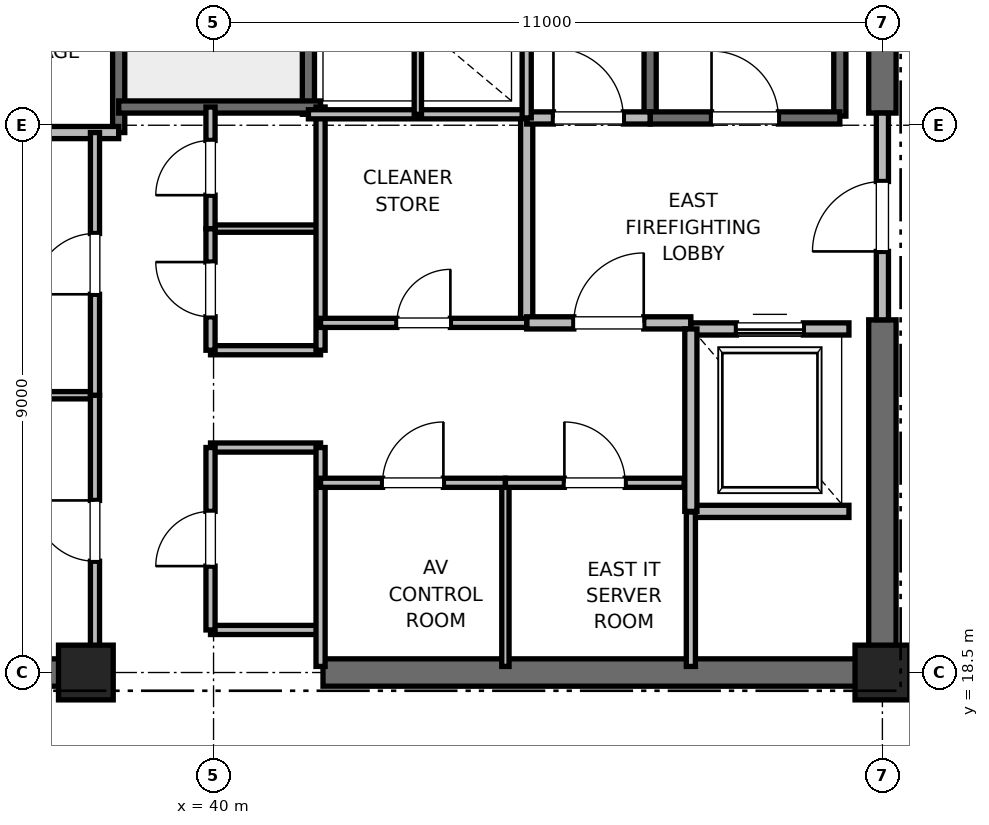
"""IFC4 building model, lengths in metres.
Left out: names, types, materials, properties, quantities, classifications, styles, units other than length and angle.
Written with IfcOpenShell. Run it as: python <this file> out.ifc"""

import sys

from ifc_helpers import new_model, si_unit, direction, frame, frame_2d, origin, origin_2d, place, context, subcontext, project, spatial, rectangle, extrude, element, fill, save


model = new_model("IFC4")
c1 = context("Model", 3, precision=1e-05, world=origin(), true_north=direction((0.0, 1.0)))
c2 = subcontext(c1, "Body", "Model", "MODEL_VIEW")
j1 = project(units=[si_unit("LENGTHUNIT", "METRE"), si_unit("PLANEANGLEUNIT", "RADIAN")], contexts=[c1])
p1 = place(None, origin())
s1 = spatial("IfcSite", under=j1, at=p1, CompositionType="ELEMENT")
p2 = place(p1, origin())
s2 = spatial("IfcBuilding", under=s1, at=p2, CompositionType="ELEMENT")
p3 = place(p2, frame((0.0, 0.0, 267.2)))
s3 = spatial("IfcBuildingStorey", under=s2, at=p3, CompositionType="ELEMENT", Elevation=267.2)
for number, where, z_axis, x_axis in (
    (1, (51.0, 18.5, 0.0), (0.0, 0.0, 1.0), (1.0, 0.0, 0.0)),
    (2, (37.9, 18.5, 0.0), (0.0, 0.0, 1.0), (1.0, 0.0, 0.0)),
):
    element("IfcColumn", number, at=place(p3, frame(where, z_axis=z_axis, x_axis=x_axis)), inside=s3, PredefinedType="PILASTER", context=c2, shape_type="SweptSolid", body=[
        extrude(rectangle(XDim=0.9, YDim=0.9, at=origin_2d()), origin(), (0.0, 0.0, 1.0), 4.0),
    ])
for number, where, z_axis, x_axis in (
    (3, (29.0, 18.5, 0.0), (0.0, 0.0, 1.0), (1.0, 0.0, 0.0)),
    (4, (41.8, 18.5, 0.0), (0.0, 0.0, 1.0), (1.0, 0.0, 0.0)),
):
    element("IfcWall", number, at=place(p3, frame(where, z_axis=z_axis, x_axis=x_axis)), inside=s3, PredefinedType="SHEAR", context=c2, shape_type="SweptSolid", body=[
        extrude(rectangle(XDim=9.2, YDim=0.45, at=frame_2d((4.6, 0.0))), origin(), (0.0, 0.0, 1.0), 3.785),
    ])
p4 = place(p3, frame((51.0, 18.5, 0.0), z_axis=(0.0, 0.0, 1.0), x_axis=(0.0, 1.0, 0.0)))
e5 = element("IfcWall", 5, at=p4, inside=s3, PredefinedType="SHEAR", context=c2, shape_type="SweptSolid", body=[
    extrude(rectangle(XDim=5.8, YDim=0.45, at=frame_2d((2.9, 0.0))), origin(), (0.0, 0.0, 1.0), 3.785),
])
p5 = place(p3, frame((51.0, 27.7, 0.0), z_axis=(0.0, 0.0, 1.0), x_axis=(0.0, 1.0, 0.0)))
e6 = element("IfcWall", 6, at=p5, inside=s3, PredefinedType="SHEAR", context=c2, shape_type="SweptSolid", body=[
    extrude(rectangle(XDim=8.8, YDim=0.45, at=frame_2d((4.4, 0.0))), origin(), (0.0, 0.0, 1.0), 3.785),
])
p6 = place(p3, frame((50.3, 27.65, 0.0), z_axis=(0.0, 0.0, 1.0), x_axis=(0.0, 1.0, 0.0)))
e7 = element("IfcWall", 7, at=p6, inside=s3, PredefinedType="SOLIDWALL", context=c2, shape_type="SweptSolid", body=[
    extrude(rectangle(XDim=8.15, YDim=0.2, at=frame_2d((4.075, 0.0))), origin(), (0.0, 0.0, 1.0), 3.785),
])
p7 = place(p3, frame((47.18, 27.62, 0.0), z_axis=(0.0, 0.0, 1.0), x_axis=(0.0, 1.0, 0.0)))
e8 = element("IfcWall", 8, at=p7, inside=s3, PredefinedType="SOLIDWALL", context=c2, shape_type="SweptSolid", body=[
    extrude(rectangle(XDim=8.18, YDim=0.2, at=frame_2d((4.09, 0.0))), origin(), (0.0, 0.0, 1.0), 3.785),
])
p8 = place(p3, frame((47.18, 27.62, 0.0), z_axis=(0.0, 0.0, 1.0), x_axis=(1.0, 0.0, 0.0)))
e9 = element("IfcWall", 9, at=p8, inside=s3, PredefinedType="SOLIDWALL", context=c2, shape_type="SweptSolid", body=[
    extrude(rectangle(XDim=3.12, YDim=0.2, at=frame_2d((1.56, 0.0))), origin(), (0.0, 0.0, 1.0), 3.785),
])
p9 = place(p8, frame((1.01, 0.0, 0.0)))
e10 = element("IfcOpeningElement", 10, at=p9, cuts=e9, PredefinedType="OPENING", context=c2, shape_type="SweptSolid", body=[
    extrude(rectangle(XDim=1.1, YDim=2.15, at=frame_2d((0.55, 1.075))), frame((0.0, 0.1, 0.0), z_axis=(0.0, -1.0, 0.0), x_axis=(1.0, 0.0, 0.0)), (0.0, 0.0, 1.0), 0.2),
])
p10 = place(p3, frame((38.44, 27.38, 0.0), z_axis=(0.0, 0.0, 1.0), x_axis=(0.0, 1.0, 0.0)))
e11 = element("IfcWall", 11, at=p10, inside=s3, PredefinedType="SOLIDWALL", context=c2, shape_type="SweptSolid", body=[
    extrude(rectangle(XDim=8.87, YDim=0.2, at=frame_2d((4.435, 0.0))), origin(), (0.0, 0.0, 1.0), 3.785),
])
p11 = place(p3, frame((41.56, 27.68, 0.0), z_axis=(0.0, 0.0, 1.0), x_axis=(0.0, 1.0, 0.0)))
e12 = element("IfcWall", 12, at=p11, inside=s3, PredefinedType="SOLIDWALL", context=c2, shape_type="SweptSolid", body=[
    extrude(rectangle(XDim=8.57, YDim=0.2, at=frame_2d((4.285, 0.0))), origin(), (0.0, 0.0, 1.0), 3.785),
])
p12 = place(p3, frame((38.44, 27.8, 0.0), z_axis=(0.0, 0.0, 1.0), x_axis=(1.0, 0.0, 0.0)))
e13 = element("IfcWall", 13, at=p12, inside=s3, PredefinedType="SOLIDWALL", context=c2, shape_type="SweptSolid", body=[
    extrude(rectangle(XDim=3.32, YDim=0.2, at=frame_2d((1.66, 0.0))), origin(), (0.0, 0.0, 1.0), 3.785),
])
p13 = place(p3, frame((32.82, 27.38, 0.0), z_axis=(0.0, 0.0, 1.0), x_axis=(1.0, 0.0, 0.0)))
e14 = element("IfcWall", 14, at=p13, inside=s3, PredefinedType="PARTITIONING", context=c2, shape_type="SweptSolid", body=[
    extrude(rectangle(XDim=5.62, YDim=0.2, at=frame_2d((2.81, 0.0))), origin(), (0.0, 0.0, 1.0), 3.785),
])
p14 = place(p3, frame((45.15, 24.25, 0.0), z_axis=(0.0, 0.0, 1.0), x_axis=(0.0, 1.0, 0.0)))
e15 = element("IfcWall", 15, at=p14, inside=s3, PredefinedType="PARTITIONING", context=c2, shape_type="SweptSolid", body=[
    extrude(rectangle(XDim=3.37, YDim=0.2, at=frame_2d((1.685, 0.0))), origin(), (0.0, 0.0, 1.0), 3.785),
])
p15 = place(p3, frame((45.15, 24.25, 0.0), z_axis=(0.0, 0.0, 1.0), x_axis=(1.0, 0.0, 0.0)))
e16 = element("IfcWall", 16, at=p15, inside=s3, PredefinedType="PARTITIONING", context=c2, shape_type="SweptSolid", body=[
    extrude(rectangle(XDim=2.7, YDim=0.2, at=frame_2d((1.35, 0.0))), origin(), (0.0, 0.0, 1.0), 3.785),
])
p16 = place(p15, frame((0.775, 0.0, 0.0)))
e17 = element("IfcOpeningElement", 17, at=p16, cuts=e16, PredefinedType="OPENING", context=c2, shape_type="SweptSolid", body=[
    extrude(rectangle(XDim=1.15, YDim=2.2, at=frame_2d((0.575, 1.1))), frame((0.0, 0.1, 0.0), z_axis=(0.0, -1.0, 0.0), x_axis=(1.0, 0.0, 0.0)), (0.0, 0.0, 1.0), 0.2),
])
p17 = place(p3, frame((45.15, 27.62, 0.0), z_axis=(0.0, 0.0, 1.0), x_axis=(1.0, 0.0, 0.0)))
e18 = element("IfcWall", 18, at=p17, inside=s3, PredefinedType="PARTITIONING", context=c2, shape_type="SweptSolid", body=[
    extrude(rectangle(XDim=2.03, YDim=0.2, at=frame_2d((1.015, 0.0))), origin(), (0.0, 0.0, 1.0), 3.785),
])
p18 = place(p17, frame((0.44, 0.0, 0.0)))
e19 = element("IfcOpeningElement", 19, at=p18, cuts=e18, PredefinedType="OPENING", context=c2, shape_type="SweptSolid", body=[
    extrude(rectangle(XDim=1.15, YDim=2.2, at=frame_2d((0.575, 1.1))), frame((0.0, 0.1, 0.0), z_axis=(0.0, -1.0, 0.0), x_axis=(1.0, 0.0, 0.0)), (0.0, 0.0, 1.0), 0.2),
])
p19 = place(p3, frame((51.0, 24.3, 0.0), z_axis=(0.0, 0.0, 1.0), x_axis=(0.0, 1.0, 0.0)))
e20 = element("IfcWall", 20, at=p19, inside=s3, PredefinedType="PARTITIONING", context=c2, shape_type="SweptSolid", body=[
    extrude(rectangle(XDim=3.4, YDim=0.2, at=frame_2d((1.7, 0.0))), origin(), (0.0, 0.0, 1.0), 2.865),
])
p20 = place(p19, frame((1.125, 0.0, 0.0)))
e21 = element("IfcOpeningElement", 21, at=p20, cuts=e20, PredefinedType="OPENING", context=c2, shape_type="SweptSolid", body=[
    extrude(rectangle(XDim=1.15, YDim=2.2, at=frame_2d((0.575, 1.1))), frame((0.0, 0.1, 0.0), z_axis=(0.0, -1.0, 0.0), x_axis=(1.0, 0.0, 0.0)), (0.0, 0.0, 1.0), 0.2),
])
p21 = place(p3, frame((47.85, 21.15, 0.0), z_axis=(0.0, 0.0, 1.0), x_axis=(1.0, 0.0, 0.0)))
e22 = element("IfcWall", 22, at=p21, inside=s3, PredefinedType="SOLIDWALL", context=c2, shape_type="SweptSolid", body=[
    extrude(rectangle(XDim=2.6, YDim=0.2, at=frame_2d((1.3, 0.0))), origin(), (0.0, 0.0, 1.0), 3.785),
])
p22 = place(p3, frame((50.45, 24.15, 0.0), z_axis=(0.0, 0.0, 1.0), x_axis=(-1.0, 0.0, 0.0)))
e23 = element("IfcWall", 23, at=p22, inside=s3, PredefinedType="SOLIDWALL", context=c2, shape_type="SweptSolid", body=[
    extrude(rectangle(XDim=2.6, YDim=0.2, at=frame_2d((1.3, 0.0))), origin(), (0.0, 0.0, 1.0), 2.865),
])
p23 = place(p22, frame((0.75, 0.0, 0.0)))
e24 = element("IfcOpeningElement", 24, at=p23, cuts=e23, PredefinedType="OPENING", context=c2, shape_type="SweptSolid", body=[
    extrude(rectangle(XDim=1.1, YDim=2.2, at=frame_2d((0.55, 1.1))), frame((0.0, 0.1, 0.0), z_axis=(0.0, -1.0, 0.0), x_axis=(1.0, 0.0, 0.0)), (0.0, 0.0, 1.0), 0.2),
])
p24 = place(p3, frame((47.85, 24.15, 0.0), z_axis=(0.0, 0.0, 1.0), x_axis=(0.0, -1.0, 0.0)))
e25 = element("IfcWall", 25, at=p24, inside=s3, PredefinedType="SOLIDWALL", context=c2, shape_type="SweptSolid", body=[
    extrude(rectangle(XDim=3.0, YDim=0.2, at=frame_2d((1.5, 0.0))), origin(), (0.0, 0.0, 1.0), 3.785),
])
for number, where, z_axis, x_axis in (
    (26, (39.95, 19.2, 0.0), (0.0, 0.0, 1.0), (1.0, 0.0, 0.0)),
    (27, (39.95, 22.2, 0.0), (0.0, 0.0, 1.0), (1.0, 0.0, 0.0)),
    (28, (39.95, 23.8, 0.0), (0.0, 0.0, 1.0), (1.0, 0.0, 0.0)),
):
    element("IfcWall", number, at=place(p3, frame(where, z_axis=z_axis, x_axis=x_axis)), inside=s3, PredefinedType="PARTITIONING", context=c2, shape_type="SweptSolid", body=[
        extrude(rectangle(XDim=1.81, YDim=0.15, at=frame_2d((0.905, 0.0))), origin(), (0.0, 0.0, 1.0), 2.85),
    ])
p25 = place(p3, frame((39.95, 25.8, 0.0), z_axis=(0.0, 0.0, 1.0), x_axis=(1.0, 0.0, 0.0)))
e29 = element("IfcWall", 29, at=p25, inside=s3, PredefinedType="PARTITIONING", context=c2, shape_type="SweptSolid", body=[
    extrude(rectangle(XDim=1.81, YDim=0.12, at=frame_2d((0.905, 0.0))), origin(), (0.0, 0.0, 1.0), 2.85),
])
p26 = place(p3, frame((41.76, 18.6, 0.0), z_axis=(0.0, 0.0, 1.0), x_axis=(0.0, 1.0, 0.0)))
e30 = element("IfcWall", 30, at=p26, inside=s3, PredefinedType="PARTITIONING", context=c2, shape_type="SweptSolid", body=[
    extrude(rectangle(XDim=3.6, YDim=0.15, at=frame_2d((1.8, 0.0))), origin(), (0.0, 0.0, 1.0), 2.85),
])
p27 = place(p3, frame((41.76, 23.8, 0.0), z_axis=(0.0, 0.0, 1.0), x_axis=(0.0, 1.0, 0.0)))
e31 = element("IfcWall", 31, at=p27, inside=s3, PredefinedType="PARTITIONING", context=c2, shape_type="SweptSolid", body=[
    extrude(rectangle(XDim=4.0, YDim=0.15, at=frame_2d((2.0, 0.0))), origin(), (0.0, 0.0, 1.0), 2.85),
])
p28 = place(p3, frame((39.95, 19.2, 0.0), z_axis=(0.0, 0.0, 1.0), x_axis=(0.0, 1.0, 0.0)))
e32 = element("IfcWall", 32, at=p28, inside=s3, PredefinedType="PARTITIONING", context=c2, shape_type="SweptSolid", body=[
    extrude(rectangle(XDim=3.0, YDim=0.15, at=frame_2d((1.5, 0.0))), origin(), (0.0, 0.0, 1.0), 2.85),
])
p29 = place(p28, frame((1.05, 0.0, 0.0)))
e33 = element("IfcOpeningElement", 33, at=p29, cuts=e32, PredefinedType="OPENING", context=c2, shape_type="SweptSolid", body=[
    extrude(rectangle(XDim=0.9, YDim=2.1, at=frame_2d((0.45, 1.05))), frame((0.0, 0.075, 0.0), z_axis=(0.0, -1.0, 0.0), x_axis=(1.0, 0.0, 0.0)), (0.0, 0.0, 1.0), 0.15),
])
p30 = place(p3, frame((39.95, 23.8, 0.0), z_axis=(0.0, 0.0, 1.0), x_axis=(0.0, 1.0, 0.0)))
e34 = element("IfcWall", 34, at=p30, inside=s3, PredefinedType="PARTITIONING", context=c2, shape_type="SweptSolid", body=[
    extrude(rectangle(XDim=2.0, YDim=0.15, at=frame_2d((1.0, 0.0))), origin(), (0.0, 0.0, 1.0), 2.85),
])
p31 = place(p30, frame((0.55, 0.0, 0.0)))
e35 = element("IfcOpeningElement", 35, at=p31, cuts=e34, PredefinedType="OPENING", context=c2, shape_type="SweptSolid", body=[
    extrude(rectangle(XDim=0.9, YDim=2.1, at=frame_2d((0.45, 1.05))), frame((0.0, 0.075, 0.0), z_axis=(0.0, -1.0, 0.0), x_axis=(1.0, 0.0, 0.0)), (0.0, 0.0, 1.0), 0.15),
])
p32 = place(p3, frame((39.95, 25.8, 0.0), z_axis=(0.0, 0.0, 1.0), x_axis=(0.0, 1.0, 0.0)))
e36 = element("IfcWall", 36, at=p32, inside=s3, PredefinedType="PARTITIONING", context=c2, shape_type="SweptSolid", body=[
    extrude(rectangle(XDim=2.0, YDim=0.15, at=frame_2d((1.0, 0.0))), origin(), (0.0, 0.0, 1.0), 2.85),
])
p33 = place(p32, frame((0.55, 0.0, 0.0)))
e37 = element("IfcOpeningElement", 37, at=p33, cuts=e36, PredefinedType="OPENING", context=c2, shape_type="SweptSolid", body=[
    extrude(rectangle(XDim=0.9, YDim=2.1, at=frame_2d((0.45, 1.05))), frame((0.0, 0.075, 0.0), z_axis=(0.0, -1.0, 0.0), x_axis=(1.0, 0.0, 0.0)), (0.0, 0.0, 1.0), 0.15),
])
p34 = place(p3, frame((32.82, 23.06, 0.0), z_axis=(0.0, 0.0, 1.0), x_axis=(1.0, 0.0, 0.0)))
e38 = element("IfcWall", 38, at=p34, inside=s3, PredefinedType="PARTITIONING", context=c2, shape_type="SweptSolid", body=[
    extrude(rectangle(XDim=5.23, YDim=0.12, at=frame_2d((2.615, 0.0))), origin(), (0.0, 0.0, 1.0), 2.85),
])
p35 = place(p3, frame((38.05, 18.6, 0.0), z_axis=(0.0, 0.0, 1.0), x_axis=(0.0, 1.0, 0.0)))
e39 = element("IfcWall", 39, at=p35, inside=s3, PredefinedType="PARTITIONING", context=c2, shape_type="SweptSolid", body=[
    extrude(rectangle(XDim=4.46, YDim=0.15, at=frame_2d((2.23, 0.0))), origin(), (0.0, 0.0, 1.0), 2.85),
])
p36 = place(p35, frame((1.73, 0.0, 0.0)))
e40 = element("IfcOpeningElement", 40, at=p36, cuts=e39, PredefinedType="OPENING", context=c2, shape_type="SweptSolid", body=[
    extrude(rectangle(XDim=1.0, YDim=2.15, at=frame_2d((0.5, 1.075))), frame((0.0, 0.075, 0.0), z_axis=(0.0, -1.0, 0.0), x_axis=(1.0, 0.0, 0.0)), (0.0, 0.0, 1.0), 0.15),
])
p37 = place(p3, frame((38.05, 23.06, 0.0), z_axis=(0.0, 0.0, 1.0), x_axis=(0.0, 1.0, 0.0)))
e41 = element("IfcWall", 41, at=p37, inside=s3, PredefinedType="PARTITIONING", context=c2, shape_type="SweptSolid", body=[
    extrude(rectangle(XDim=4.32, YDim=0.15, at=frame_2d((2.16, 0.0))), origin(), (0.0, 0.0, 1.0), 2.85),
])
p38 = place(p37, frame((1.66, 0.0, 0.0)))
e42 = element("IfcOpeningElement", 42, at=p38, cuts=e41, PredefinedType="OPENING", context=c2, shape_type="SweptSolid", body=[
    extrude(rectangle(XDim=1.0, YDim=2.15, at=frame_2d((0.5, 1.075))), frame((0.0, 0.075, 0.0), z_axis=(0.0, -1.0, 0.0), x_axis=(1.0, 0.0, 0.0)), (0.0, 0.0, 1.0), 0.15),
])
p39 = place(p3, frame((41.56, 27.68, 0.0), z_axis=(0.0, 0.0, 1.0), x_axis=(1.0, 0.0, 0.0)))
e43 = element("IfcWall", 43, at=p39, inside=s3, PredefinedType="PARTITIONING", context=c2, shape_type="SweptSolid", body=[
    extrude(rectangle(XDim=3.59, YDim=0.15, at=frame_2d((1.795, 0.0))), origin(), (0.0, 0.0, 1.0), 2.85),
])
p40 = place(p3, frame((47.85, 18.6, 0.0), z_axis=(0.0, 0.0, 1.0), x_axis=(0.0, 1.0, 0.0)))
e44 = element("IfcWall", 44, at=p40, inside=s3, PredefinedType="PARTITIONING", context=c2, shape_type="SweptSolid", body=[
    extrude(rectangle(XDim=2.54, YDim=0.15, at=frame_2d((1.27, 0.0))), origin(), (0.0, 0.0, 1.0), 2.85),
])
p41 = place(p3, frame((44.8, 18.6, 0.0), z_axis=(0.0, 0.0, 1.0), x_axis=(0.0, 1.0, 0.0)))
e45 = element("IfcWall", 45, at=p41, inside=s3, PredefinedType="PARTITIONING", context=c2, shape_type="SweptSolid", body=[
    extrude(rectangle(XDim=3.02, YDim=0.12, at=frame_2d((1.51, 0.0))), origin(), (0.0, 0.0, 1.0), 2.85),
])
p42 = place(p3, frame((41.76, 21.62, 0.0), z_axis=(0.0, 0.0, 1.0), x_axis=(1.0, 0.0, 0.0)))
e46 = element("IfcWall", 46, at=p42, inside=s3, PredefinedType="PARTITIONING", context=c2, shape_type="SweptSolid", body=[
    extrude(rectangle(XDim=3.04, YDim=0.15, at=frame_2d((1.52, 0.0))), origin(), (0.0, 0.0, 1.0), 2.85),
])
p43 = place(p42, frame((1.02, 0.0, 0.0)))
e47 = element("IfcOpeningElement", 47, at=p43, cuts=e46, PredefinedType="OPENING", context=c2, shape_type="SweptSolid", body=[
    extrude(rectangle(XDim=1.0, YDim=2.15, at=frame_2d((0.5, 1.075))), frame((0.0, 0.075, 0.0), z_axis=(0.0, -1.0, 0.0), x_axis=(1.0, 0.0, 0.0)), (0.0, 0.0, 1.0), 0.15),
])
p44 = place(p3, frame((44.8, 21.62, 0.0), z_axis=(0.0, 0.0, 1.0), x_axis=(1.0, 0.0, 0.0)))
e48 = element("IfcWall", 48, at=p44, inside=s3, PredefinedType="PARTITIONING", context=c2, shape_type="SweptSolid", body=[
    extrude(rectangle(XDim=2.94, YDim=0.15, at=frame_2d((1.47, 0.0))), origin(), (0.0, 0.0, 1.0), 2.85),
])
p45 = place(p44, frame((0.97, 0.0, 0.0)))
e49 = element("IfcOpeningElement", 49, at=p45, cuts=e48, PredefinedType="OPENING", context=c2, shape_type="SweptSolid", body=[
    extrude(rectangle(XDim=1.0, YDim=2.15, at=frame_2d((0.5, 1.075))), frame((0.0, 0.075, 0.0), z_axis=(0.0, -1.0, 0.0), x_axis=(1.0, 0.0, 0.0)), (0.0, 0.0, 1.0), 0.15),
])
p46 = place(p3, frame((41.76, 24.25, 0.0), z_axis=(0.0, 0.0, 1.0), x_axis=(1.0, 0.0, 0.0)))
e50 = element("IfcWall", 50, at=p46, inside=s3, PredefinedType="PARTITIONING", context=c2, shape_type="SweptSolid", body=[
    extrude(rectangle(XDim=3.39, YDim=0.15, at=frame_2d((1.695, 0.0))), origin(), (0.0, 0.0, 1.0), 2.85),
])
p47 = place(p46, frame((1.255, 0.0, 0.0)))
e51 = element("IfcOpeningElement", 51, at=p47, cuts=e50, PredefinedType="OPENING", context=c2, shape_type="SweptSolid", body=[
    extrude(rectangle(XDim=0.88, YDim=2.1, at=frame_2d((0.44, 1.05))), frame((0.0, 0.075, 0.0), z_axis=(0.0, -1.0, 0.0), x_axis=(1.0, 0.0, 0.0)), (0.0, 0.0, 1.0), 0.15),
])
p48 = place(p3, frame((45.15, 27.62, 0.0), z_axis=(0.0, 0.0, 1.0), x_axis=(0.0, 1.0, 0.0)))
e52 = element("IfcWall", 52, at=p48, inside=s3, PredefinedType="PARTITIONING", context=c2, shape_type="SweptSolid", body=[
    extrude(rectangle(XDim=3.1, YDim=0.15, at=frame_2d((1.55, 0.0))), origin(), (0.0, 0.0, 1.0), 2.85),
])
p49 = place(p3, frame((43.36, 27.68, 0.0), z_axis=(0.0, 0.0, 1.0), x_axis=(0.0, 1.0, 0.0)))
e53 = element("IfcWall", 53, at=p49, inside=s3, PredefinedType="PARTITIONING", context=c2, shape_type="SweptSolid", body=[
    extrude(rectangle(XDim=3.04, YDim=0.12, at=frame_2d((1.52, 0.0))), origin(), (0.0, 0.0, 1.0), 2.85),
])
p50 = place(p9, origin())
e54 = element("IfcDoor", 54, at=p50, inside=s3, OperationType="SINGLE_SWING_LEFT", PredefinedType="DOOR", context=c2, shape_type="SweptSolid", body=[
    extrude(rectangle(XDim=1.1, YDim=2.15, at=frame_2d((0.55, 1.075))), frame((0.0, 0.025, 0.0), z_axis=(0.0, -1.0, 0.0), x_axis=(1.0, 0.0, 0.0)), (0.0, 0.0, 1.0), 0.05),
])
fill(e10, e54)
p51 = place(p16, origin())
e55 = element("IfcDoor", 55, at=p51, inside=s3, OperationType="SINGLE_SWING_RIGHT", PredefinedType="DOOR", context=c2, shape_type="SweptSolid", body=[
    extrude(rectangle(XDim=1.15, YDim=2.2, at=frame_2d((0.575, 1.1))), frame((0.0, 0.025, 0.0), z_axis=(0.0, -1.0, 0.0), x_axis=(1.0, 0.0, 0.0)), (0.0, 0.0, 1.0), 0.05),
])
fill(e17, e55)
p52 = place(p18, origin())
e56 = element("IfcDoor", 56, at=p52, inside=s3, OperationType="SINGLE_SWING_LEFT", PredefinedType="DOOR", context=c2, shape_type="SweptSolid", body=[
    extrude(rectangle(XDim=1.15, YDim=2.2, at=frame_2d((0.575, 1.1))), frame((0.0, 0.025, 0.0), z_axis=(0.0, -1.0, 0.0), x_axis=(1.0, 0.0, 0.0)), (0.0, 0.0, 1.0), 0.05),
])
fill(e19, e56)
p53 = place(p20, origin())
e57 = element("IfcDoor", 57, at=p53, inside=s3, OperationType="SINGLE_SWING_LEFT", PredefinedType="DOOR", context=c2, shape_type="SweptSolid", body=[
    extrude(rectangle(XDim=1.15, YDim=2.2, at=frame_2d((0.575, 1.1))), frame((0.0, 0.025, 0.0), z_axis=(0.0, -1.0, 0.0), x_axis=(1.0, 0.0, 0.0)), (0.0, 0.0, 1.0), 0.05),
])
fill(e21, e57)
p54 = place(p23, origin())
e58 = element("IfcDoor", 58, at=p54, inside=s3, OperationType="SLIDING_TO_RIGHT", PredefinedType="DOOR", context=c2, shape_type="SweptSolid", body=[
    extrude(rectangle(XDim=1.1, YDim=2.2, at=frame_2d((0.55, 1.1))), frame((0.0, 0.025, 0.0), z_axis=(0.0, -1.0, 0.0), x_axis=(1.0, 0.0, 0.0)), (0.0, 0.0, 1.0), 0.05),
])
fill(e24, e58)
p55 = place(p29, origin())
e59 = element("IfcDoor", 59, at=p55, inside=s3, OperationType="SINGLE_SWING_LEFT", PredefinedType="DOOR", context=c2, shape_type="SweptSolid", body=[
    extrude(rectangle(XDim=0.9, YDim=2.1, at=frame_2d((0.45, 1.05))), frame((0.0, 0.025, 0.0), z_axis=(0.0, -1.0, 0.0), x_axis=(1.0, 0.0, 0.0)), (0.0, 0.0, 1.0), 0.05),
])
fill(e33, e59)
p56 = place(p31, origin())
e60 = element("IfcDoor", 60, at=p56, inside=s3, OperationType="SINGLE_SWING_RIGHT", PredefinedType="DOOR", context=c2, shape_type="SweptSolid", body=[
    extrude(rectangle(XDim=0.9, YDim=2.1, at=frame_2d((0.45, 1.05))), frame((0.0, 0.025, 0.0), z_axis=(0.0, -1.0, 0.0), x_axis=(1.0, 0.0, 0.0)), (0.0, 0.0, 1.0), 0.05),
])
fill(e35, e60)
p57 = place(p33, origin())
e61 = element("IfcDoor", 61, at=p57, inside=s3, OperationType="SINGLE_SWING_LEFT", PredefinedType="DOOR", context=c2, shape_type="SweptSolid", body=[
    extrude(rectangle(XDim=0.9, YDim=2.1, at=frame_2d((0.45, 1.05))), frame((0.0, 0.025, 0.0), z_axis=(0.0, -1.0, 0.0), x_axis=(1.0, 0.0, 0.0)), (0.0, 0.0, 1.0), 0.05),
])
fill(e37, e61)
p58 = place(p36, origin())
e62 = element("IfcDoor", 62, at=p58, inside=s3, OperationType="SINGLE_SWING_RIGHT", PredefinedType="DOOR", context=c2, shape_type="SweptSolid", body=[
    extrude(rectangle(XDim=1.0, YDim=2.15, at=frame_2d((0.5, 1.075))), frame((0.0, 0.025, 0.0), z_axis=(0.0, -1.0, 0.0), x_axis=(1.0, 0.0, 0.0)), (0.0, 0.0, 1.0), 0.05),
])
fill(e40, e62)
p59 = place(p38, origin())
e63 = element("IfcDoor", 63, at=p59, inside=s3, OperationType="SINGLE_SWING_LEFT", PredefinedType="DOOR", context=c2, shape_type="SweptSolid", body=[
    extrude(rectangle(XDim=1.0, YDim=2.15, at=frame_2d((0.5, 1.075))), frame((0.0, 0.025, 0.0), z_axis=(0.0, -1.0, 0.0), x_axis=(1.0, 0.0, 0.0)), (0.0, 0.0, 1.0), 0.05),
])
fill(e42, e63)
p60 = place(p43, origin())
e64 = element("IfcDoor", 64, at=p60, inside=s3, OperationType="SINGLE_SWING_RIGHT", PredefinedType="DOOR", context=c2, shape_type="SweptSolid", body=[
    extrude(rectangle(XDim=1.0, YDim=2.15, at=frame_2d((0.5, 1.075))), frame((0.0, 0.025, 0.0), z_axis=(0.0, -1.0, 0.0), x_axis=(1.0, 0.0, 0.0)), (0.0, 0.0, 1.0), 0.05),
])
fill(e47, e64)
p61 = place(p45, origin())
e65 = element("IfcDoor", 65, at=p61, inside=s3, OperationType="SINGLE_SWING_LEFT", PredefinedType="DOOR", context=c2, shape_type="SweptSolid", body=[
    extrude(rectangle(XDim=1.0, YDim=2.15, at=frame_2d((0.5, 1.075))), frame((0.0, 0.025, 0.0), z_axis=(0.0, -1.0, 0.0), x_axis=(1.0, 0.0, 0.0)), (0.0, 0.0, 1.0), 0.05),
])
fill(e49, e65)
p62 = place(p47, origin())
e66 = element("IfcDoor", 66, at=p62, inside=s3, OperationType="SINGLE_SWING_RIGHT", PredefinedType="DOOR", context=c2, shape_type="SweptSolid", body=[
    extrude(rectangle(XDim=0.88, YDim=2.1, at=frame_2d((0.44, 1.05))), frame((0.0, 0.025, 0.0), z_axis=(0.0, -1.0, 0.0), x_axis=(1.0, 0.0, 0.0)), (0.0, 0.0, 1.0), 0.05),
])
fill(e51, e66)
save(model, sys.argv[1])
